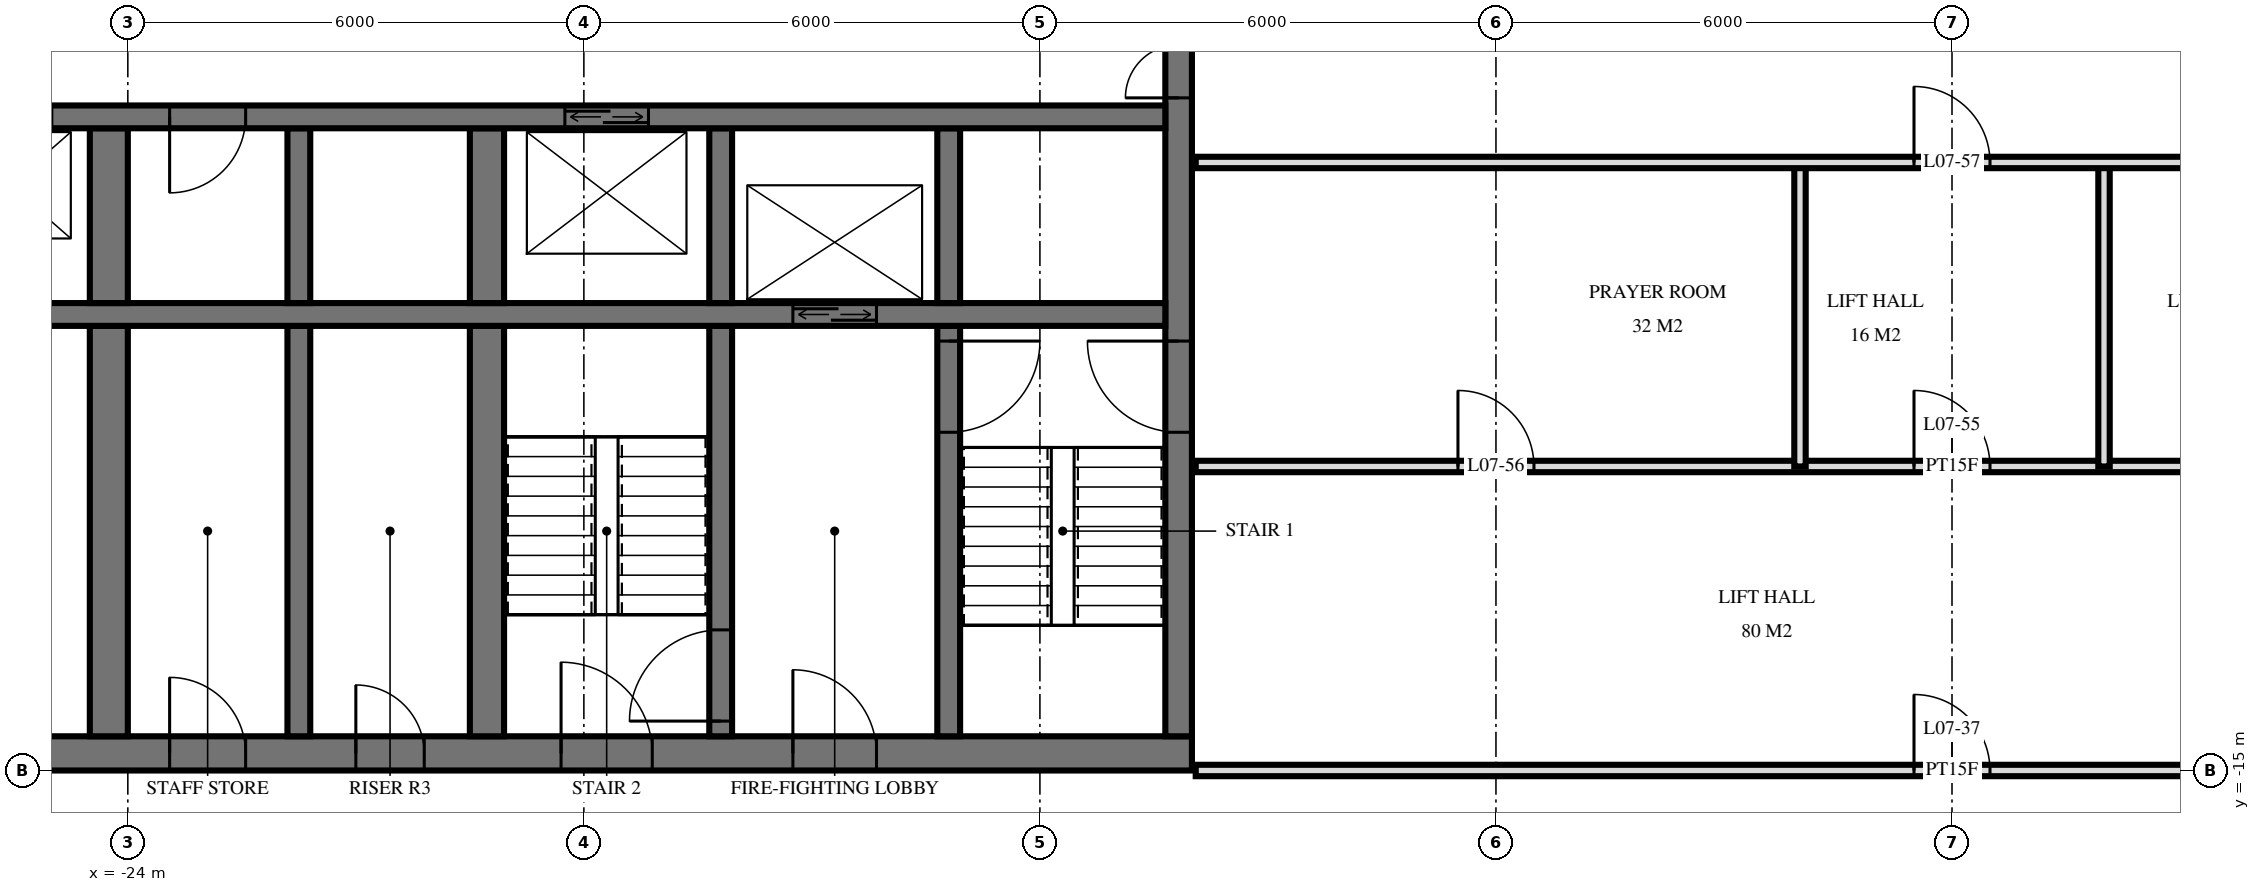
"""IFC4 building model, lengths in metres.
Left out: names, types, materials, properties, quantities, classifications, styles, units other than length and angle.
Written with IfcOpenShell. Run it as: python <this file> out.ifc"""

import sys

from ifc_helpers import new_model, si_unit, direction, frame, frame_2d, origin, place, context, subcontext, project, spatial, rectangle, extrude, element, fill, save


model = new_model("IFC4")
c1 = context("Model", 3, precision=1e-05, world=origin(), true_north=direction((0.0, 1.0)))
c2 = subcontext(c1, "Body", "Model", "MODEL_VIEW")
j1 = project(units=[si_unit("LENGTHUNIT", "METRE"), si_unit("PLANEANGLEUNIT", "RADIAN")], contexts=[c1])
p1 = place(None, origin())
s1 = spatial("IfcSite", under=j1, at=p1, CompositionType="ELEMENT")
p2 = place(p1, origin())
s2 = spatial("IfcBuilding", under=s1, at=p2, CompositionType="ELEMENT")
p3 = place(p2, frame((0.0, 0.0, 34.8)))
s3 = spatial("IfcBuildingStorey", under=s2, at=p3, CompositionType="ELEMENT", Elevation=34.8)
p4 = place(p3, frame((-29.5, -14.775, 0.0), z_axis=(0.0, 0.0, 1.0), x_axis=(1.0, 0.0, 0.0)))
e1 = element("IfcWall", 1, at=p4, inside=s3, PredefinedType="SHEAR", context=c2, shape_type="SweptSolid", body=[
    extrude(rectangle(XDim=19.5, YDim=0.45, at=frame_2d((9.75, 0.0))), origin(), (0.0, 0.0, 1.0), 3.6),
])
p5 = place(p4, frame((11.2, 0.0, 0.0)))
e2 = element("IfcOpeningElement", 2, at=p5, cuts=e1, PredefinedType="OPENING", context=c2, shape_type="SweptSolid", body=[
    extrude(rectangle(XDim=1.2, YDim=2.1, at=frame_2d((0.6, 1.05))), frame((0.0, 0.235, 0.0), z_axis=(0.0, -1.0, 0.0), x_axis=(1.0, 0.0, 0.0)), (0.0, 0.0, 1.0), 0.47),
])
p6 = place(p4, frame((14.25, 0.0, 0.0)))
e3 = element("IfcOpeningElement", 3, at=p6, cuts=e1, PredefinedType="OPENING", context=c2, shape_type="SweptSolid", body=[
    extrude(rectangle(XDim=1.1, YDim=2.1, at=frame_2d((0.55, 1.05))), frame((0.0, 0.235, 0.0), z_axis=(0.0, -1.0, 0.0), x_axis=(1.0, 0.0, 0.0)), (0.0, 0.0, 1.0), 0.47),
])
p7 = place(p4, frame((8.5, 0.0, 0.0)))
e4 = element("IfcOpeningElement", 4, at=p7, cuts=e1, PredefinedType="OPENING", context=c2, shape_type="SweptSolid", body=[
    extrude(rectangle(XDim=0.9, YDim=2.1, at=frame_2d((0.45, 1.05))), frame((0.0, 0.235, 0.0), z_axis=(0.0, -1.0, 0.0), x_axis=(1.0, 0.0, 0.0)), (0.0, 0.0, 1.0), 0.47),
])
p8 = place(p4, frame((6.05, 0.0, 0.0)))
e5 = element("IfcOpeningElement", 5, at=p8, cuts=e1, PredefinedType="OPENING", context=c2, shape_type="SweptSolid", body=[
    extrude(rectangle(XDim=1.0, YDim=2.1, at=frame_2d((0.5, 1.05))), frame((0.0, 0.235, 0.0), z_axis=(0.0, -1.0, 0.0), x_axis=(1.0, 0.0, 0.0)), (0.0, 0.0, 1.0), 0.47),
])
p9 = place(p4, frame((2.988, 0.0, 0.0)))
e6 = element("IfcOpeningElement", 6, at=p9, cuts=e1, PredefinedType="OPENING", context=c2, shape_type="SweptSolid", body=[
    extrude(rectangle(XDim=1.0, YDim=2.1, at=frame_2d((0.5, 1.05))), frame((0.0, 0.235, 0.0), z_axis=(0.0, -1.0, 0.0), x_axis=(1.0, 0.0, 0.0)), (0.0, 0.0, 1.0), 0.47),
])
p10 = place(p4, frame((0.663, 0.0, 0.0)))
e7 = element("IfcOpeningElement", 7, at=p10, cuts=e1, PredefinedType="OPENING", context=c2, shape_type="SweptSolid", body=[
    extrude(rectangle(XDim=1.0, YDim=2.1, at=frame_2d((0.5, 1.05))), frame((0.0, 0.235, 0.0), z_axis=(0.0, -1.0, 0.0), x_axis=(1.0, 0.0, 0.0)), (0.0, 0.0, 1.0), 0.47),
])
p11 = place(p3, frame((-10.175, -14.55, 0.0), z_axis=(0.0, 0.0, 1.0), x_axis=(0.0, 1.0, 0.0)))
e8 = element("IfcWall", 8, at=p11, inside=s3, PredefinedType="SHEAR", context=c2, shape_type="SweptSolid", body=[
    extrude(rectangle(XDim=14.1, YDim=0.35, at=frame_2d((7.05, 0.0))), origin(), (0.0, 0.0, 1.0), 3.6),
])
p12 = place(p11, frame((8.4, 0.0, 0.0)))
e9 = element("IfcOpeningElement", 9, at=p12, cuts=e8, PredefinedType="OPENING", context=c2, shape_type="SweptSolid", body=[
    extrude(rectangle(XDim=1.4, YDim=2.4, at=frame_2d((0.7, 1.2))), frame((0.0, 0.185, 0.0), z_axis=(0.0, -1.0, 0.0), x_axis=(1.0, 0.0, 0.0)), (0.0, 0.0, 1.0), 0.37),
])
p13 = place(p11, frame((10.0, 0.0, 0.0)))
e10 = element("IfcOpeningElement", 10, at=p13, cuts=e8, PredefinedType="OPENING", context=c2, shape_type="SweptSolid", body=[
    extrude(rectangle(XDim=1.4, YDim=2.4, at=frame_2d((0.7, 1.2))), frame((0.0, 0.185, 0.0), z_axis=(0.0, -1.0, 0.0), x_axis=(1.0, 0.0, 0.0)), (0.0, 0.0, 1.0), 0.37),
])
p14 = place(p11, frame((4.0, 0.0, 0.0)))
e11 = element("IfcOpeningElement", 11, at=p14, cuts=e8, PredefinedType="OPENING", context=c2, shape_type="SweptSolid", body=[
    extrude(rectangle(XDim=1.2, YDim=2.1, at=frame_2d((0.6, 1.05))), frame((0.0, 0.185, 0.0), z_axis=(0.0, -1.0, 0.0), x_axis=(1.0, 0.0, 0.0)), (0.0, 0.0, 1.0), 0.37),
])
p15 = place(p3, frame((-29.05, -6.4, 0.0), z_axis=(0.0, 0.0, 1.0), x_axis=(1.0, 0.0, 0.0)))
e12 = element("IfcWall", 12, at=p15, inside=s3, PredefinedType="SHEAR", context=c2, shape_type="SweptSolid", body=[
    extrude(rectangle(XDim=18.7, YDim=0.3, at=frame_2d((9.35, 0.0))), origin(), (0.0, 0.0, 1.0), 3.6),
])
p16 = place(p15, frame((2.95, 0.0, 0.0)))
e13 = element("IfcOpeningElement", 13, at=p16, cuts=e12, PredefinedType="OPENING", context=c2, shape_type="SweptSolid", body=[
    extrude(rectangle(XDim=1.1, YDim=2.1, at=frame_2d((0.55, 1.05))), frame((0.0, 0.16, 0.0), z_axis=(0.0, -1.0, 0.0), x_axis=(1.0, 0.0, 0.0)), (0.0, 0.0, 1.0), 0.32),
])
p17 = place(p15, frame((0.55, 0.0, 0.0)))
e14 = element("IfcOpeningElement", 14, at=p17, cuts=e12, PredefinedType="OPENING", context=c2, shape_type="SweptSolid", body=[
    extrude(rectangle(XDim=1.1, YDim=2.1, at=frame_2d((0.55, 1.05))), frame((0.0, 0.16, 0.0), z_axis=(0.0, -1.0, 0.0), x_axis=(1.0, 0.0, 0.0)), (0.0, 0.0, 1.0), 0.32),
])
p18 = place(p15, frame((10.8, 0.0, 0.0)))
e15 = element("IfcOpeningElement", 15, at=p18, cuts=e12, PredefinedType="OPENING", context=c2, shape_type="SweptSolid", body=[
    extrude(rectangle(XDim=1.1, YDim=2.1, at=frame_2d((0.55, 1.05))), frame((0.0, 0.16, 0.0), z_axis=(0.0, -1.0, 0.0), x_axis=(1.0, 0.0, 0.0)), (0.0, 0.0, 1.0), 0.32),
])
p19 = place(p15, frame((5.6, 0.0, 0.0)))
e16 = element("IfcOpeningElement", 16, at=p19, cuts=e12, PredefinedType="OPENING", context=c2, shape_type="SweptSolid", body=[
    extrude(rectangle(XDim=1.0, YDim=2.1, at=frame_2d((0.5, 1.05))), frame((0.0, 0.16, 0.0), z_axis=(0.0, -1.0, 0.0), x_axis=(1.0, 0.0, 0.0)), (0.0, 0.0, 1.0), 0.32),
])
p20 = place(p3, frame((-29.05, -9.0, 0.0), z_axis=(0.0, 0.0, 1.0), x_axis=(1.0, 0.0, 0.0)))
e17 = element("IfcWall", 17, at=p20, inside=s3, PredefinedType="SHEAR", context=c2, shape_type="SweptSolid", body=[
    extrude(rectangle(XDim=18.7, YDim=0.3, at=frame_2d((9.35, 0.0))), origin(), (0.0, 0.0, 1.0), 3.6),
])
p21 = place(p20, frame((13.8, 0.0, 0.0)))
e18 = element("IfcOpeningElement", 18, at=p21, cuts=e17, PredefinedType="OPENING", context=c2, shape_type="SweptSolid", body=[
    extrude(rectangle(XDim=1.1, YDim=2.1, at=frame_2d((0.55, 1.05))), frame((0.0, 0.16, 0.0), z_axis=(0.0, -1.0, 0.0), x_axis=(1.0, 0.0, 0.0)), (0.0, 0.0, 1.0), 0.32),
])
p22 = place(p3, frame((-13.2, -8.85, 0.0), z_axis=(0.0, 0.0, 1.0), x_axis=(0.0, 1.0, 0.0)))
e19 = element("IfcWall", 19, at=p22, inside=s3, PredefinedType="SHEAR", context=c2, shape_type="SweptSolid", body=[
    extrude(rectangle(XDim=2.3, YDim=0.3, at=frame_2d((1.15, 0.0))), origin(), (0.0, 0.0, 1.0), 3.6),
])
p23 = place(p3, frame((-13.2, -14.55, 0.0), z_axis=(0.0, 0.0, 1.0), x_axis=(0.0, 1.0, 0.0)))
e20 = element("IfcWall", 20, at=p23, inside=s3, PredefinedType="SHEAR", context=c2, shape_type="SweptSolid", body=[
    extrude(rectangle(XDim=5.4, YDim=0.3, at=frame_2d((2.7, 0.0))), origin(), (0.0, 0.0, 1.0), 3.6),
])
p24 = place(p23, frame((4.0, 0.0, 0.0)))
e21 = element("IfcOpeningElement", 21, at=p24, cuts=e20, PredefinedType="OPENING", context=c2, shape_type="SweptSolid", body=[
    extrude(rectangle(XDim=1.2, YDim=2.1, at=frame_2d((0.6, 1.05))), frame((0.0, 0.16, 0.0), z_axis=(0.0, -1.0, 0.0), x_axis=(1.0, 0.0, 0.0)), (0.0, 0.0, 1.0), 0.32),
])
p25 = place(p3, frame((-16.2, -8.85, 0.0), z_axis=(0.0, 0.0, 1.0), x_axis=(0.0, 1.0, 0.0)))
e22 = element("IfcWall", 22, at=p25, inside=s3, PredefinedType="SHEAR", context=c2, shape_type="SweptSolid", body=[
    extrude(rectangle(XDim=2.3, YDim=0.3, at=frame_2d((1.15, 0.0))), origin(), (0.0, 0.0, 1.0), 3.6),
])
p26 = place(p3, frame((-16.2, -14.55, 0.0), z_axis=(0.0, 0.0, 1.0), x_axis=(0.0, 1.0, 0.0)))
e23 = element("IfcWall", 23, at=p26, inside=s3, PredefinedType="SHEAR", context=c2, shape_type="SweptSolid", body=[
    extrude(rectangle(XDim=5.4, YDim=0.3, at=frame_2d((2.7, 0.0))), origin(), (0.0, 0.0, 1.0), 3.6),
])
p27 = place(p26, frame((0.2, 0.0, 0.0)))
e24 = element("IfcOpeningElement", 24, at=p27, cuts=e23, PredefinedType="OPENING", context=c2, shape_type="SweptSolid", body=[
    extrude(rectangle(XDim=1.2, YDim=2.1, at=frame_2d((0.6, 1.05))), frame((0.0, 0.16, 0.0), z_axis=(0.0, -1.0, 0.0), x_axis=(1.0, 0.0, 0.0)), (0.0, 0.0, 1.0), 0.32),
])
p28 = place(p3, frame((-19.275, -8.85, 0.0), z_axis=(0.0, 0.0, 1.0), x_axis=(0.0, 1.0, 0.0)))
e25 = element("IfcWall", 25, at=p28, inside=s3, PredefinedType="SHEAR", context=c2, shape_type="SweptSolid", body=[
    extrude(rectangle(XDim=2.3, YDim=0.45, at=frame_2d((1.15, 0.0))), origin(), (0.0, 0.0, 1.0), 3.6),
])
p29 = place(p3, frame((-19.275, -14.55, 0.0), z_axis=(0.0, 0.0, 1.0), x_axis=(0.0, 1.0, 0.0)))
e26 = element("IfcWall", 26, at=p29, inside=s3, PredefinedType="SHEAR", context=c2, shape_type="SweptSolid", body=[
    extrude(rectangle(XDim=5.4, YDim=0.45, at=frame_2d((2.7, 0.0))), origin(), (0.0, 0.0, 1.0), 3.6),
])
p30 = place(p3, frame((-21.75, -8.85, 0.0), z_axis=(0.0, 0.0, 1.0), x_axis=(0.0, 1.0, 0.0)))
e27 = element("IfcWall", 27, at=p30, inside=s3, PredefinedType="SHEAR", context=c2, shape_type="SweptSolid", body=[
    extrude(rectangle(XDim=2.3, YDim=0.3, at=frame_2d((1.15, 0.0))), origin(), (0.0, 0.0, 1.0), 3.6),
])
p31 = place(p3, frame((-21.75, -14.55, 0.0), z_axis=(0.0, 0.0, 1.0), x_axis=(0.0, 1.0, 0.0)))
e28 = element("IfcWall", 28, at=p31, inside=s3, PredefinedType="SHEAR", context=c2, shape_type="SweptSolid", body=[
    extrude(rectangle(XDim=5.4, YDim=0.3, at=frame_2d((2.7, 0.0))), origin(), (0.0, 0.0, 1.0), 3.6),
])
p32 = place(p3, frame((-24.25, -8.85, 0.0), z_axis=(0.0, 0.0, 1.0), x_axis=(0.0, 1.0, 0.0)))
e29 = element("IfcWall", 29, at=p32, inside=s3, PredefinedType="SHEAR", context=c2, shape_type="SweptSolid", body=[
    extrude(rectangle(XDim=2.3, YDim=0.5, at=frame_2d((1.15, 0.0))), origin(), (0.0, 0.0, 1.0), 3.6),
])
p33 = place(p3, frame((-24.25, -14.55, 0.0), z_axis=(0.0, 0.0, 1.0), x_axis=(0.0, 1.0, 0.0)))
e30 = element("IfcWall", 30, at=p33, inside=s3, PredefinedType="SHEAR", context=c2, shape_type="SweptSolid", body=[
    extrude(rectangle(XDim=5.4, YDim=0.5, at=frame_2d((2.7, 0.0))), origin(), (0.0, 0.0, 1.0), 3.6),
])
for number, where, z_axis, x_axis in (
    (31, (2.0, -11.0, 0.0), (0.0, 0.0, 1.0), (0.0, 1.0, 0.0)),
    (32, (-2.0, -11.0, 0.0), (0.0, 0.0, 1.0), (0.0, 1.0, 0.0)),
):
    element("IfcWall", number, at=place(p3, frame(where, z_axis=z_axis, x_axis=x_axis)), inside=s3, PredefinedType="PARTITIONING", context=c2, shape_type="SweptSolid", body=[
        extrude(rectangle(XDim=4.0, YDim=0.15, at=frame_2d((2.0, 0.0))), origin(), (0.0, 0.0, 1.0), 3.32),
    ])
p34 = place(p3, frame((-9.95, -15.0, 0.0), z_axis=(0.0, 0.0, 1.0), x_axis=(1.0, 0.0, 0.0)))
e33 = element("IfcWall", 33, at=p34, inside=s3, PredefinedType="PARTITIONING", context=c2, shape_type="SweptSolid", body=[
    extrude(rectangle(XDim=19.9, YDim=0.15, at=frame_2d((9.95, 0.0))), origin(), (0.0, 0.0, 1.0), 2.684),
])
p35 = place(p34, frame((9.45, 0.0, 0.0)))
e34 = element("IfcOpeningElement", 34, at=p35, cuts=e33, PredefinedType="OPENING", context=c2, shape_type="SweptSolid", body=[
    extrude(rectangle(XDim=1.0, YDim=2.1, at=frame_2d((0.5, 1.05))), frame((0.0, 0.085, 0.0), z_axis=(0.0, -1.0, 0.0), x_axis=(1.0, 0.0, 0.0)), (0.0, 0.0, 1.0), 0.17),
])
p36 = place(p3, frame((-9.95, -11.0, 0.0), z_axis=(0.0, 0.0, 1.0), x_axis=(1.0, 0.0, 0.0)))
e35 = element("IfcWall", 35, at=p36, inside=s3, PredefinedType="PARTITIONING", context=c2, shape_type="SweptSolid", body=[
    extrude(rectangle(XDim=19.9, YDim=0.15, at=frame_2d((9.95, 0.0))), origin(), (0.0, 0.0, 1.0), 3.32),
])
p37 = place(p36, frame((9.45, 0.0, 0.0)))
e36 = element("IfcOpeningElement", 36, at=p37, cuts=e35, PredefinedType="OPENING", context=c2, shape_type="SweptSolid", body=[
    extrude(rectangle(XDim=1.0, YDim=2.1, at=frame_2d((0.5, 1.05))), frame((0.0, 0.085, 0.0), z_axis=(0.0, -1.0, 0.0), x_axis=(1.0, 0.0, 0.0)), (0.0, 0.0, 1.0), 0.17),
])
p38 = place(p36, frame((3.45, 0.0, 0.0)))
e37 = element("IfcOpeningElement", 37, at=p38, cuts=e35, PredefinedType="OPENING", context=c2, shape_type="SweptSolid", body=[
    extrude(rectangle(XDim=1.0, YDim=2.1, at=frame_2d((0.5, 1.05))), frame((0.0, 0.085, 0.0), z_axis=(0.0, -1.0, 0.0), x_axis=(1.0, 0.0, 0.0)), (0.0, 0.0, 1.0), 0.17),
])
p39 = place(p3, frame((-9.95, -7.0, 0.0), z_axis=(0.0, 0.0, 1.0), x_axis=(1.0, 0.0, 0.0)))
e38 = element("IfcWall", 38, at=p39, inside=s3, PredefinedType="PARTITIONING", context=c2, shape_type="SweptSolid", body=[
    extrude(rectangle(XDim=19.9, YDim=0.15, at=frame_2d((9.95, 0.0))), origin(), (0.0, 0.0, 1.0), 3.32),
])
p40 = place(p39, frame((9.45, 0.0, 0.0)))
e39 = element("IfcOpeningElement", 39, at=p40, cuts=e38, PredefinedType="OPENING", context=c2, shape_type="SweptSolid", body=[
    extrude(rectangle(XDim=1.0, YDim=2.1, at=frame_2d((0.5, 1.05))), frame((0.0, 0.085, 0.0), z_axis=(0.0, -1.0, 0.0), x_axis=(1.0, 0.0, 0.0)), (0.0, 0.0, 1.0), 0.17),
])
p41 = place(p39, frame((15.45, 0.0, 0.0)))
e40 = element("IfcOpeningElement", 40, at=p41, cuts=e38, PredefinedType="OPENING", context=c2, shape_type="SweptSolid", body=[
    extrude(rectangle(XDim=1.0, YDim=2.1, at=frame_2d((0.5, 1.05))), frame((0.0, 0.085, 0.0), z_axis=(0.0, -1.0, 0.0), x_axis=(1.0, 0.0, 0.0)), (0.0, 0.0, 1.0), 0.17),
])
p42 = place(p21, origin())
e41 = element("IfcDoor", 41, at=p42, inside=s3, OperationType="DOUBLE_DOOR_SLIDING", PredefinedType="USERDEFINED", context=c2, shape_type="SweptSolid", body=[
    extrude(rectangle(XDim=1.1, YDim=2.1, at=frame_2d((0.55, 1.05))), frame((0.0, 0.025, 0.0), z_axis=(0.0, -1.0, 0.0), x_axis=(1.0, 0.0, 0.0)), (0.0, 0.0, 1.0), 0.05),
])
fill(e18, e41)
p43 = place(p18, origin())
e42 = element("IfcDoor", 42, at=p43, inside=s3, OperationType="DOUBLE_DOOR_SLIDING", PredefinedType="USERDEFINED", context=c2, shape_type="SweptSolid", body=[
    extrude(rectangle(XDim=1.1, YDim=2.1, at=frame_2d((0.55, 1.05))), frame((0.0, 0.025, 0.0), z_axis=(0.0, -1.0, 0.0), x_axis=(1.0, 0.0, 0.0)), (0.0, 0.0, 1.0), 0.05),
])
fill(e15, e42)
p44 = place(p12, origin())
e43 = element("IfcDoor", 43, at=p44, inside=s3, OperationType="DOUBLE_DOOR_SINGLE_SWING", PredefinedType="DOOR", context=c2, shape_type="SweptSolid", body=[
    extrude(rectangle(XDim=1.4, YDim=2.4, at=frame_2d((0.7, 1.2))), frame((0.0, 0.025, 0.0), z_axis=(0.0, -1.0, 0.0), x_axis=(1.0, 0.0, 0.0)), (0.0, 0.0, 1.0), 0.05),
])
fill(e9, e43)
p45 = place(p14, origin())
e44 = element("IfcDoor", 44, at=p45, inside=s3, OperationType="SINGLE_SWING_LEFT", PredefinedType="DOOR", context=c2, shape_type="SweptSolid", body=[
    extrude(rectangle(XDim=1.2, YDim=2.1, at=frame_2d((0.6, 1.05))), frame((0.0, 0.025, 0.0), z_axis=(0.0, -1.0, 0.0), x_axis=(1.0, 0.0, 0.0)), (0.0, 0.0, 1.0), 0.05),
])
fill(e11, e44)
p46 = place(p5, origin())
e45 = element("IfcDoor", 45, at=p46, inside=s3, OperationType="SINGLE_SWING_RIGHT", PredefinedType="DOOR", context=c2, shape_type="SweptSolid", body=[
    extrude(rectangle(XDim=1.2, YDim=2.1, at=frame_2d((0.6, 1.05))), frame((0.0, 0.025, 0.0), z_axis=(0.0, -1.0, 0.0), x_axis=(1.0, 0.0, 0.0)), (0.0, 0.0, 1.0), 0.05),
])
fill(e2, e45)
p47 = place(p6, origin())
e46 = element("IfcDoor", 46, at=p47, inside=s3, OperationType="SINGLE_SWING_RIGHT", PredefinedType="DOOR", context=c2, shape_type="SweptSolid", body=[
    extrude(rectangle(XDim=1.1, YDim=2.1, at=frame_2d((0.55, 1.05))), frame((0.0, 0.025, 0.0), z_axis=(0.0, -1.0, 0.0), x_axis=(1.0, 0.0, 0.0)), (0.0, 0.0, 1.0), 0.05),
])
fill(e3, e46)
p48 = place(p7, origin())
e47 = element("IfcDoor", 47, at=p48, inside=s3, OperationType="SINGLE_SWING_RIGHT", PredefinedType="DOOR", context=c2, shape_type="SweptSolid", body=[
    extrude(rectangle(XDim=0.9, YDim=2.1, at=frame_2d((0.45, 1.05))), frame((0.0, 0.025, 0.0), z_axis=(0.0, -1.0, 0.0), x_axis=(1.0, 0.0, 0.0)), (0.0, 0.0, 1.0), 0.05),
])
fill(e4, e47)
p49 = place(p8, origin())
e48 = element("IfcDoor", 48, at=p49, inside=s3, OperationType="SINGLE_SWING_RIGHT", PredefinedType="DOOR", context=c2, shape_type="SweptSolid", body=[
    extrude(rectangle(XDim=1.0, YDim=2.1, at=frame_2d((0.5, 1.05))), frame((0.0, 0.025, 0.0), z_axis=(0.0, -1.0, 0.0), x_axis=(1.0, 0.0, 0.0)), (0.0, 0.0, 1.0), 0.05),
])
fill(e5, e48)
p50 = place(p19, frame((0.5, 0.0, 0.0), z_axis=(0.0, 0.0, 1.0), x_axis=(-1.0, 0.0, 0.0)))
e49 = element("IfcDoor", 49, at=p50, inside=s3, OperationType="SINGLE_SWING_LEFT", PredefinedType="DOOR", context=c2, shape_type="SweptSolid", body=[
    extrude(rectangle(XDim=1.0, YDim=2.1, at=frame_2d((0.0, 1.05))), frame((0.0, -0.025, 0.0), z_axis=(0.0, 1.0, 0.0), x_axis=(-1.0, 0.0, 0.0)), (0.0, 0.0, 1.0), 0.05),
])
fill(e16, e49)
p51 = place(p24, frame((0.6, 0.0, 0.0), z_axis=(0.0, 0.0, 1.0), x_axis=(-1.0, 0.0, 0.0)))
e50 = element("IfcDoor", 50, at=p51, inside=s3, OperationType="SINGLE_SWING_RIGHT", PredefinedType="DOOR", context=c2, shape_type="SweptSolid", body=[
    extrude(rectangle(XDim=1.2, YDim=2.1, at=frame_2d((0.0, 1.05))), frame((0.0, -0.025, 0.0), z_axis=(0.0, 1.0, 0.0), x_axis=(-1.0, 0.0, 0.0)), (0.0, 0.0, 1.0), 0.05),
])
fill(e21, e50)
p52 = place(p27, origin())
e51 = element("IfcDoor", 51, at=p52, inside=s3, OperationType="SINGLE_SWING_RIGHT", PredefinedType="DOOR", context=c2, shape_type="SweptSolid", body=[
    extrude(rectangle(XDim=1.2, YDim=2.1, at=frame_2d((0.6, 1.05))), frame((0.0, 0.025, 0.0), z_axis=(0.0, -1.0, 0.0), x_axis=(1.0, 0.0, 0.0)), (0.0, 0.0, 1.0), 0.05),
])
fill(e24, e51)
p53 = place(p35, origin())
e52 = element("IfcDoor", 52, at=p53, inside=s3, OperationType="SINGLE_SWING_RIGHT", PredefinedType="DOOR", context=c2, shape_type="SweptSolid", body=[
    extrude(rectangle(XDim=1.0, YDim=2.1, at=frame_2d((0.5, 1.05))), frame((0.0, 0.025, 0.0), z_axis=(0.0, -1.0, 0.0), x_axis=(1.0, 0.0, 0.0)), (0.0, 0.0, 1.0), 0.05),
])
fill(e34, e52)
p54 = place(p37, origin())
e53 = element("IfcDoor", 53, at=p54, inside=s3, OperationType="SINGLE_SWING_RIGHT", PredefinedType="DOOR", context=c2, shape_type="SweptSolid", body=[
    extrude(rectangle(XDim=1.0, YDim=2.1, at=frame_2d((0.5, 1.05))), frame((0.0, 0.025, 0.0), z_axis=(0.0, -1.0, 0.0), x_axis=(1.0, 0.0, 0.0)), (0.0, 0.0, 1.0), 0.05),
])
fill(e36, e53)
p55 = place(p38, origin())
e54 = element("IfcDoor", 54, at=p55, inside=s3, OperationType="SINGLE_SWING_RIGHT", PredefinedType="DOOR", context=c2, shape_type="SweptSolid", body=[
    extrude(rectangle(XDim=1.0, YDim=2.1, at=frame_2d((0.5, 1.05))), frame((0.0, 0.025, 0.0), z_axis=(0.0, -1.0, 0.0), x_axis=(1.0, 0.0, 0.0)), (0.0, 0.0, 1.0), 0.05),
])
fill(e37, e54)
p56 = place(p40, origin())
e55 = element("IfcDoor", 55, at=p56, inside=s3, OperationType="SINGLE_SWING_RIGHT", PredefinedType="DOOR", context=c2, shape_type="SweptSolid", body=[
    extrude(rectangle(XDim=1.0, YDim=2.1, at=frame_2d((0.5, 1.05))), frame((0.0, 0.025, 0.0), z_axis=(0.0, -1.0, 0.0), x_axis=(1.0, 0.0, 0.0)), (0.0, 0.0, 1.0), 0.05),
])
fill(e39, e55)
save(model, sys.argv[1])
